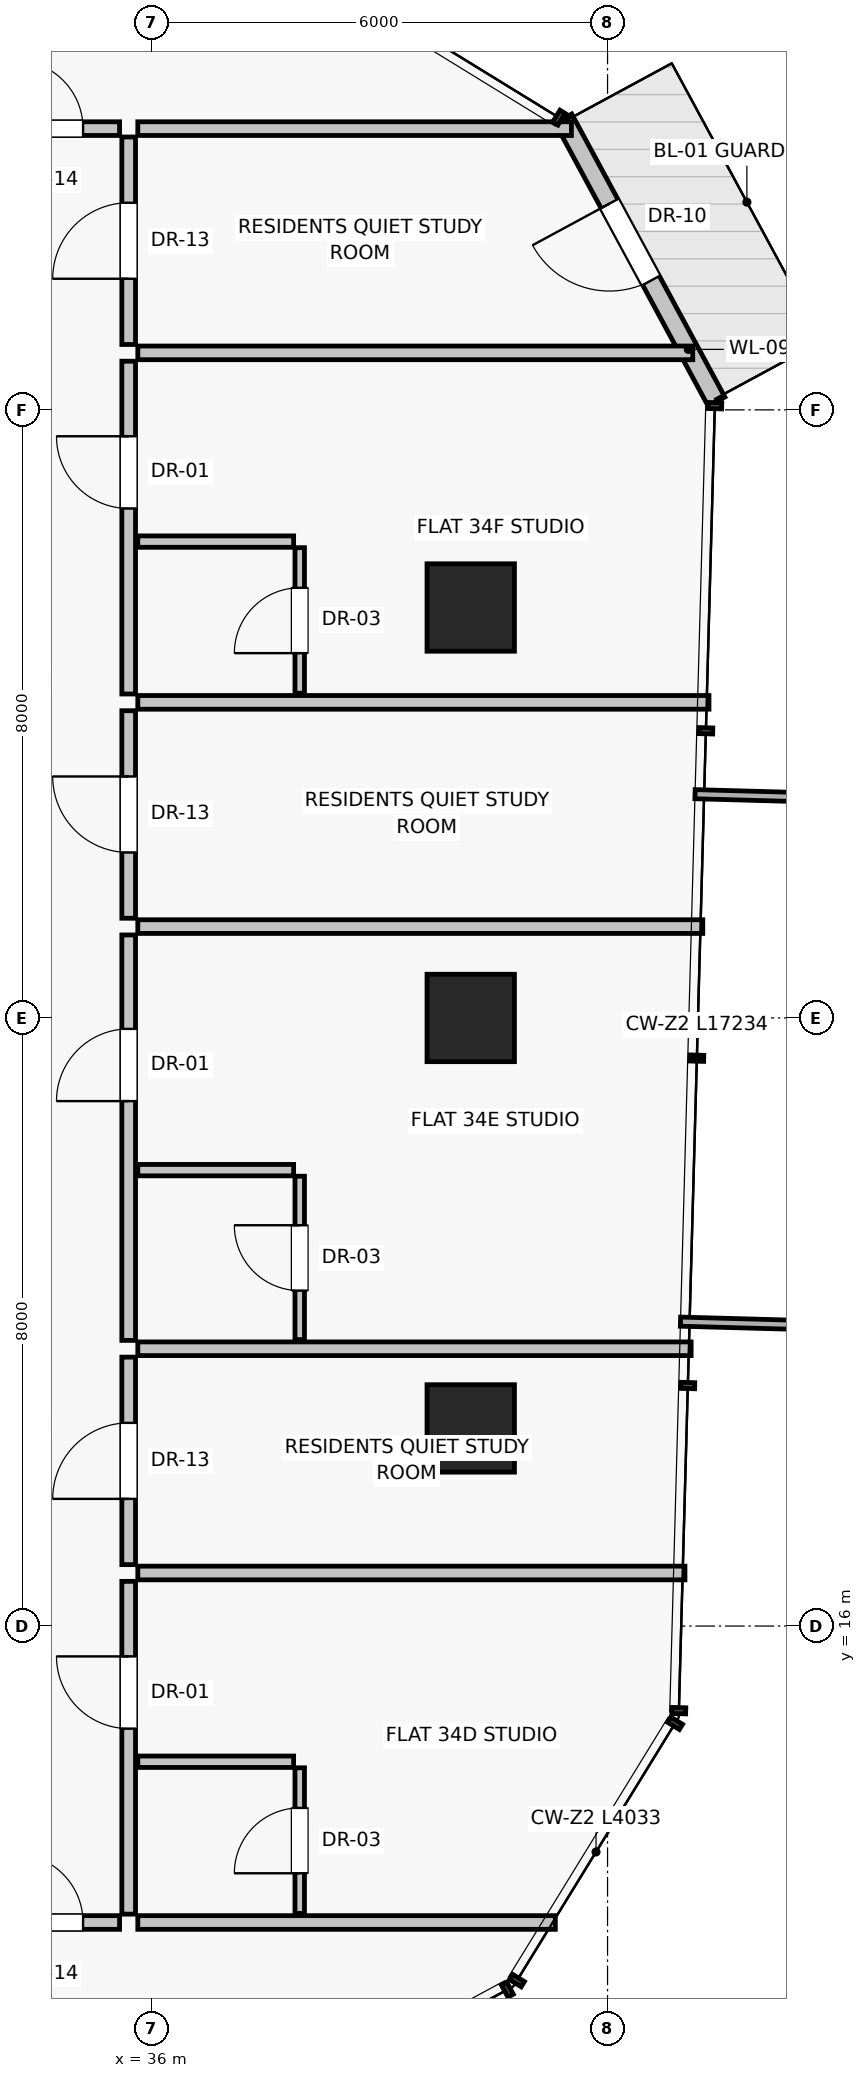
"""IFC4 building model, lengths in metres.
Left out: names, types, materials, properties, quantities, classifications, styles, units other than length and angle.
Written with IfcOpenShell. Run it as: python <this file> out.ifc"""

import sys

from ifc_helpers import new_model, si_unit, direction, frame, frame_2d, origin, origin_2d, place, context, subcontext, project, spatial, rectangle, extrude, source, transform, mapped, element, fill, save


model = new_model("IFC4")
c1 = context("Model", 3, precision=1e-05, world=origin(), true_north=direction((0.0, 1.0)))
c2 = subcontext(c1, "Body", "Model", "MODEL_VIEW")
j1 = project(units=[si_unit("LENGTHUNIT", "METRE"), si_unit("PLANEANGLEUNIT", "RADIAN")], contexts=[c1])
p1 = place(None, origin())
s1 = spatial("IfcSite", under=j1, at=p1, CompositionType="ELEMENT")
p2 = place(p1, origin())
s2 = spatial("IfcBuilding", under=s1, at=p2, CompositionType="ELEMENT")
p3 = place(p2, frame((0.0, 0.0, 123.0)))
s3 = spatial("IfcBuildingStorey", under=s2, at=p3, CompositionType="ELEMENT", Elevation=123.0)
for number, where, z_axis, x_axis in (
    (1, (40.2, 18.6, 0.0), (0.0, 0.0, 1.0), (1.0, 0.0, 0.0)),
    (2, (40.2, 24.0, 0.0), (0.0, 0.0, 1.0), (1.0, 0.0, 0.0)),
    (3, (40.2, 29.4, 0.0), (0.0, 0.0, 1.0), (1.0, 0.0, 0.0)),
):
    element("IfcColumn", number, at=place(p3, frame(where, z_axis=z_axis, x_axis=x_axis)), inside=s3, PredefinedType="COLUMN", context=c2, shape_type="SweptSolid", body=[
        extrude(rectangle(XDim=1.15, YDim=1.15, at=origin_2d()), origin(), (0.0, 0.0, 1.0), 3.25),
    ])
p4 = place(p3, frame((43.433, 32.11, 0.0), z_axis=(0.0, 0.0, 1.0), x_axis=(-0.47593195268, 0.879482106934, 0.0)))
e4 = element("IfcWall", 4, at=p4, inside=s3, PredefinedType="SOLIDWALL", context=c2, shape_type="SweptSolid", body=[
    extrude(rectangle(XDim=4.233, YDim=0.25, at=frame_2d((2.117, 0.0))), origin(), (0.0, 0.0, 1.0), 3.0),
])
p5 = place(p4, frame((1.81, 0.0, 0.0)))
e5 = element("IfcOpeningElement", 5, at=p5, cuts=e4, PredefinedType="OPENING", context=c2, shape_type="SweptSolid", body=[
    extrude(rectangle(XDim=1.15, YDim=2.25, at=frame_2d((0.575, 1.125))), frame((0.0, 0.135, 0.0), z_axis=(0.0, -1.0, 0.0), x_axis=(1.0, 0.0, 0.0)), (0.0, 0.0, 1.0), 0.27),
])
p6 = place(p3, frame((35.82, 12.1, 0.0), z_axis=(0.0, 0.0, 1.0), x_axis=(1.0, 0.0, 0.0)))
e6 = element("IfcWall", 6, at=p6, inside=s3, PredefinedType="PARTITIONING", context=c2, shape_type="SweptSolid", body=[
    extrude(rectangle(XDim=5.493, YDim=0.18, at=frame_2d((2.747, 0.0))), origin(), (0.0, 0.0, 1.0), 3.0),
])
p7 = place(p3, frame((35.82, 35.7, 0.0), z_axis=(0.0, 0.0, 1.0), x_axis=(1.0, 0.0, 0.0)))
e7 = element("IfcWall", 7, at=p7, inside=s3, PredefinedType="PARTITIONING", context=c2, shape_type="SweptSolid", body=[
    extrude(rectangle(XDim=5.705, YDim=0.18, at=frame_2d((2.852, 0.0))), origin(), (0.0, 0.0, 1.0), 3.0),
])
p8 = place(p3, frame((35.7, 16.808, 0.0), z_axis=(0.0, 0.0, 1.0), x_axis=(0.0, 1.0, 0.0)))
e8 = element("IfcWall", 8, at=p8, inside=s3, PredefinedType="PARTITIONING", context=c2, shape_type="SweptSolid", body=[
    extrude(rectangle(XDim=2.73, YDim=0.18, at=frame_2d((1.365, 0.0))), origin(), (0.0, 0.0, 1.0), 2.58),
])
p9 = place(p8, frame((0.865, 0.0, 0.0)))
e9 = element("IfcOpeningElement", 9, at=p9, cuts=e8, PredefinedType="OPENING", context=c2, shape_type="SweptSolid", body=[
    extrude(rectangle(XDim=1.0, YDim=2.01, at=frame_2d((0.5, 1.005))), frame((0.0, 0.1, 0.0), z_axis=(0.0, -1.0, 0.0), x_axis=(1.0, 0.0, 0.0)), (0.0, 0.0, 1.0), 0.2),
])
p10 = place(p3, frame((35.82, 16.698, 0.0), z_axis=(0.0, 0.0, 1.0), x_axis=(1.0, 0.0, 0.0)))
e10 = element("IfcWall", 10, at=p10, inside=s3, PredefinedType="PARTITIONING", context=c2, shape_type="SweptSolid", body=[
    extrude(rectangle(XDim=7.198, YDim=0.18, at=frame_2d((3.599, 0.0))), origin(), (0.0, 0.0, 1.0), 3.0),
])
p11 = place(p3, frame((35.7, 12.21, 0.0), z_axis=(0.0, 0.0, 1.0), x_axis=(0.0, 1.0, 0.0)))
e11 = element("IfcWall", 11, at=p11, inside=s3, PredefinedType="PARTITIONING", context=c2, shape_type="SweptSolid", body=[
    extrude(rectangle(XDim=4.378, YDim=0.18, at=frame_2d((2.189, 0.0))), origin(), (0.0, 0.0, 1.0), 3.0),
])
p12 = place(p11, frame((2.441, 0.0, 0.0)))
e12 = element("IfcOpeningElement", 12, at=p12, cuts=e11, PredefinedType="OPENING", context=c2, shape_type="SweptSolid", body=[
    extrude(rectangle(XDim=0.95, YDim=2.02, at=frame_2d((0.475, 1.01))), frame((0.0, 0.1, 0.0), z_axis=(0.0, -1.0, 0.0), x_axis=(1.0, 0.0, 0.0)), (0.0, 0.0, 1.0), 0.2),
])
p13 = place(p3, frame((35.82, 14.215, 0.0), z_axis=(0.0, 0.0, 1.0), x_axis=(1.0, 0.0, 0.0)))
e13 = element("IfcWall", 13, at=p13, inside=s3, PredefinedType="PARTITIONING", context=c2, shape_type="SweptSolid", body=[
    extrude(rectangle(XDim=2.05, YDim=0.15, at=frame_2d((1.025, 0.0))), origin(), (0.0, 0.0, 1.0), 3.0),
])
p14 = place(p3, frame((37.95, 12.22, 0.0), z_axis=(0.0, 0.0, 1.0), x_axis=(0.0, 1.0, 0.0)))
e14 = element("IfcWall", 14, at=p14, inside=s3, PredefinedType="PARTITIONING", context=c2, shape_type="SweptSolid", body=[
    extrude(rectangle(XDim=1.915, YDim=0.125, at=frame_2d((0.958, 0.0))), origin(), (0.0, 0.0, 1.0), 3.0),
])
p15 = place(p14, frame((0.528, 0.0, 0.0)))
e15 = element("IfcOpeningElement", 15, at=p15, cuts=e14, PredefinedType="OPENING", context=c2, shape_type="SweptSolid", body=[
    extrude(rectangle(XDim=0.86, YDim=2.01, at=frame_2d((0.43, 1.005))), frame((0.0, 0.073, 0.0), z_axis=(0.0, -1.0, 0.0), x_axis=(1.0, 0.0, 0.0)), (0.0, 0.0, 1.0), 0.145),
])
p16 = place(p3, frame((35.82, 19.648, 0.0), z_axis=(0.0, 0.0, 1.0), x_axis=(1.0, 0.0, 0.0)))
e16 = element("IfcWall", 16, at=p16, inside=s3, PredefinedType="PARTITIONING", context=c2, shape_type="SweptSolid", body=[
    extrude(rectangle(XDim=7.28, YDim=0.18, at=frame_2d((3.64, 0.0))), origin(), (0.0, 0.0, 1.0), 3.0),
])
p17 = place(p3, frame((35.7, 25.312, 0.0), z_axis=(0.0, 0.0, 1.0), x_axis=(0.0, 1.0, 0.0)))
e17 = element("IfcWall", 17, at=p17, inside=s3, PredefinedType="PARTITIONING", context=c2, shape_type="SweptSolid", body=[
    extrude(rectangle(XDim=2.73, YDim=0.18, at=frame_2d((1.365, 0.0))), origin(), (0.0, 0.0, 1.0), 2.58),
])
p18 = place(p17, frame((0.865, 0.0, 0.0)))
e18 = element("IfcOpeningElement", 18, at=p18, cuts=e17, PredefinedType="OPENING", context=c2, shape_type="SweptSolid", body=[
    extrude(rectangle(XDim=1.0, YDim=2.01, at=frame_2d((0.5, 1.005))), frame((0.0, 0.1, 0.0), z_axis=(0.0, -1.0, 0.0), x_axis=(1.0, 0.0, 0.0)), (0.0, 0.0, 1.0), 0.2),
])
p19 = place(p3, frame((35.82, 25.202, 0.0), z_axis=(0.0, 0.0, 1.0), x_axis=(1.0, 0.0, 0.0)))
e19 = element("IfcWall", 19, at=p19, inside=s3, PredefinedType="PARTITIONING", context=c2, shape_type="SweptSolid", body=[
    extrude(rectangle(XDim=7.433, YDim=0.18, at=frame_2d((3.716, 0.0))), origin(), (0.0, 0.0, 1.0), 3.0),
])
p20 = place(p3, frame((35.7, 19.758, 0.0), z_axis=(0.0, 0.0, 1.0), x_axis=(0.0, 1.0, 0.0)))
e20 = element("IfcWall", 20, at=p20, inside=s3, PredefinedType="PARTITIONING", context=c2, shape_type="SweptSolid", body=[
    extrude(rectangle(XDim=5.334, YDim=0.18, at=frame_2d((2.667, 0.0))), origin(), (0.0, 0.0, 1.0), 2.58),
])
p21 = place(p20, frame((3.148, 0.0, 0.0)))
e21 = element("IfcOpeningElement", 21, at=p21, cuts=e20, PredefinedType="OPENING", context=c2, shape_type="SweptSolid", body=[
    extrude(rectangle(XDim=0.95, YDim=2.02, at=frame_2d((0.475, 1.01))), frame((0.0, 0.1, 0.0), z_axis=(0.0, -1.0, 0.0), x_axis=(1.0, 0.0, 0.0)), (0.0, 0.0, 1.0), 0.2),
])
p22 = place(p3, frame((35.82, 21.998, 0.0), z_axis=(0.0, 0.0, 1.0), x_axis=(1.0, 0.0, 0.0)))
e22 = element("IfcWall", 22, at=p22, inside=s3, PredefinedType="PARTITIONING", context=c2, shape_type="SweptSolid", body=[
    extrude(rectangle(XDim=2.05, YDim=0.15, at=frame_2d((1.025, 0.0))), origin(), (0.0, 0.0, 1.0), 3.0),
])
p23 = place(p3, frame((37.95, 19.768, 0.0), z_axis=(0.0, 0.0, 1.0), x_axis=(0.0, 1.0, 0.0)))
e23 = element("IfcWall", 23, at=p23, inside=s3, PredefinedType="PARTITIONING", context=c2, shape_type="SweptSolid", body=[
    extrude(rectangle(XDim=2.15, YDim=0.125, at=frame_2d((1.075, 0.0))), origin(), (0.0, 0.0, 1.0), 3.0),
])
p24 = place(p23, frame((0.645, 0.0, 0.0)))
e24 = element("IfcOpeningElement", 24, at=p24, cuts=e23, PredefinedType="OPENING", context=c2, shape_type="SweptSolid", body=[
    extrude(rectangle(XDim=0.86, YDim=2.01, at=frame_2d((0.43, 1.005))), frame((0.0, 0.073, 0.0), z_axis=(0.0, -1.0, 0.0), x_axis=(1.0, 0.0, 0.0)), (0.0, 0.0, 1.0), 0.145),
])
p25 = place(p3, frame((35.82, 28.152, 0.0), z_axis=(0.0, 0.0, 1.0), x_axis=(1.0, 0.0, 0.0)))
e25 = element("IfcWall", 25, at=p25, inside=s3, PredefinedType="PARTITIONING", context=c2, shape_type="SweptSolid", body=[
    extrude(rectangle(XDim=7.514, YDim=0.18, at=frame_2d((3.757, 0.0))), origin(), (0.0, 0.0, 1.0), 3.0),
])
p26 = place(p3, frame((35.7, 32.86, 0.0), z_axis=(0.0, 0.0, 1.0), x_axis=(0.0, 1.0, 0.0)))
e26 = element("IfcWall", 26, at=p26, inside=s3, PredefinedType="PARTITIONING", context=c2, shape_type="SweptSolid", body=[
    extrude(rectangle(XDim=2.73, YDim=0.18, at=frame_2d((1.365, 0.0))), origin(), (0.0, 0.0, 1.0), 3.0),
])
p27 = place(p26, frame((0.865, 0.0, 0.0)))
e27 = element("IfcOpeningElement", 27, at=p27, cuts=e26, PredefinedType="OPENING", context=c2, shape_type="SweptSolid", body=[
    extrude(rectangle(XDim=1.0, YDim=2.01, at=frame_2d((0.5, 1.005))), frame((0.0, 0.1, 0.0), z_axis=(0.0, -1.0, 0.0), x_axis=(1.0, 0.0, 0.0)), (0.0, 0.0, 1.0), 0.2),
])
p28 = place(p3, frame((35.82, 32.75, 0.0), z_axis=(0.0, 0.0, 1.0), x_axis=(1.0, 0.0, 0.0)))
e28 = element("IfcWall", 28, at=p28, inside=s3, PredefinedType="PARTITIONING", context=c2, shape_type="SweptSolid", body=[
    extrude(rectangle(XDim=7.301, YDim=0.18, at=frame_2d((3.65, 0.0))), origin(), (0.0, 0.0, 1.0), 3.0),
])
p29 = place(p3, frame((35.7, 28.262, 0.0), z_axis=(0.0, 0.0, 1.0), x_axis=(0.0, 1.0, 0.0)))
e29 = element("IfcWall", 29, at=p29, inside=s3, PredefinedType="PARTITIONING", context=c2, shape_type="SweptSolid", body=[
    extrude(rectangle(XDim=4.378, YDim=0.18, at=frame_2d((2.189, 0.0))), origin(), (0.0, 0.0, 1.0), 2.58),
])
p30 = place(p29, frame((2.441, 0.0, 0.0)))
e30 = element("IfcOpeningElement", 30, at=p30, cuts=e29, PredefinedType="OPENING", context=c2, shape_type="SweptSolid", body=[
    extrude(rectangle(XDim=0.95, YDim=2.02, at=frame_2d((0.475, 1.01))), frame((0.0, 0.1, 0.0), z_axis=(0.0, -1.0, 0.0), x_axis=(1.0, 0.0, 0.0)), (0.0, 0.0, 1.0), 0.2),
])
p31 = place(p3, frame((35.82, 30.267, 0.0), z_axis=(0.0, 0.0, 1.0), x_axis=(1.0, 0.0, 0.0)))
e31 = element("IfcWall", 31, at=p31, inside=s3, PredefinedType="PARTITIONING", context=c2, shape_type="SweptSolid", body=[
    extrude(rectangle(XDim=2.05, YDim=0.15, at=frame_2d((1.025, 0.0))), origin(), (0.0, 0.0, 1.0), 2.378),
])
p32 = place(p3, frame((37.95, 28.272, 0.0), z_axis=(0.0, 0.0, 1.0), x_axis=(0.0, 1.0, 0.0)))
e32 = element("IfcWall", 32, at=p32, inside=s3, PredefinedType="PARTITIONING", context=c2, shape_type="SweptSolid", body=[
    extrude(rectangle(XDim=1.915, YDim=0.125, at=frame_2d((0.958, 0.0))), origin(), (0.0, 0.0, 1.0), 3.0),
])
p33 = place(p32, frame((0.528, 0.0, 0.0)))
e33 = element("IfcOpeningElement", 33, at=p33, cuts=e32, PredefinedType="OPENING", context=c2, shape_type="SweptSolid", body=[
    extrude(rectangle(XDim=0.86, YDim=2.01, at=frame_2d((0.43, 1.005))), frame((0.0, 0.073, 0.0), z_axis=(0.0, -1.0, 0.0), x_axis=(1.0, 0.0, 0.0)), (0.0, 0.0, 1.0), 0.145),
])
p34 = place(p3, frame((33.72, 12.1, 0.0), z_axis=(0.0, 0.0, 1.0), x_axis=(1.0, 0.0, 0.0)))
e34 = element("IfcWall", 34, at=p34, inside=s3, PredefinedType="PARTITIONING", context=c2, shape_type="SweptSolid", body=[
    extrude(rectangle(XDim=1.86, YDim=0.18, at=frame_2d((0.93, 0.0))), origin(), (0.0, 0.0, 1.0), 3.0),
])
p35 = place(p34, frame((0.48, 0.0, 0.0)))
e35 = element("IfcOpeningElement", 35, at=p35, cuts=e34, PredefinedType="OPENING", context=c2, shape_type="SweptSolid", body=[
    extrude(rectangle(XDim=0.9, YDim=2.01, at=frame_2d((0.45, 1.005))), frame((0.0, 0.1, 0.0), z_axis=(0.0, -1.0, 0.0), x_axis=(1.0, 0.0, 0.0)), (0.0, 0.0, 1.0), 0.2),
])
p36 = place(p3, frame((33.72, 35.7, 0.0), z_axis=(0.0, 0.0, 1.0), x_axis=(1.0, 0.0, 0.0)))
e36 = element("IfcWall", 36, at=p36, inside=s3, PredefinedType="PARTITIONING", context=c2, shape_type="SweptSolid", body=[
    extrude(rectangle(XDim=1.86, YDim=0.18, at=frame_2d((0.93, 0.0))), origin(), (0.0, 0.0, 1.0), 3.0),
])
p37 = place(p36, frame((0.48, 0.0, 0.0)))
e37 = element("IfcOpeningElement", 37, at=p37, cuts=e36, PredefinedType="OPENING", context=c2, shape_type="SweptSolid", body=[
    extrude(rectangle(XDim=0.9, YDim=2.01, at=frame_2d((0.45, 1.005))), frame((0.0, 0.1, 0.0), z_axis=(0.0, -1.0, 0.0), x_axis=(1.0, 0.0, 0.0)), (0.0, 0.0, 1.0), 0.2),
])
m1 = source(origin(), c2, "Body", "SweptSolid", [
    extrude(rectangle(XDim=1.15, YDim=2.25, at=frame_2d((0.575, 1.125))), frame((0.0, 0.025, 0.0), z_axis=(0.0, -1.0, 0.0), x_axis=(1.0, 0.0, 0.0)), (0.0, 0.0, 1.0), 0.05),
])
p38 = place(p5, frame((1.15, 0.0, 0.0), z_axis=(0.0, 0.0, 1.0), x_axis=(-1.0, 0.0, 0.0)))
e38 = element("IfcDoor", 38, at=p38, inside=s3, OperationType="SINGLE_SWING_RIGHT", PredefinedType="DOOR", context=c2, shape_type="MappedRepresentation", body=[
    mapped(m1, transform((0.0, 0.0, 0.0), scale=1.0)),
])
fill(e5, e38)
m2 = source(origin(), c2, "Body", "SweptSolid", [
    extrude(rectangle(XDim=1.0, YDim=2.01, at=frame_2d((0.5, 1.005))), frame((0.0, 0.025, 0.0), z_axis=(0.0, -1.0, 0.0), x_axis=(1.0, 0.0, 0.0)), (0.0, 0.0, 1.0), 0.05),
])
p39 = place(p9, origin())
e39 = element("IfcDoor", 39, at=p39, inside=s3, OperationType="SINGLE_SWING_LEFT", PredefinedType="DOOR", context=c2, shape_type="MappedRepresentation", body=[
    mapped(m2, transform((0.0, 0.0, 0.0), scale=1.0)),
])
fill(e9, e39)
m3 = source(origin(), c2, "Body", "SweptSolid", [
    extrude(rectangle(XDim=0.95, YDim=2.02, at=frame_2d((0.475, 1.01))), frame((0.0, 0.025, 0.0), z_axis=(0.0, -1.0, 0.0), x_axis=(1.0, 0.0, 0.0)), (0.0, 0.0, 1.0), 0.05),
])
p40 = place(p12, origin())
e40 = element("IfcDoor", 40, at=p40, inside=s3, OperationType="SINGLE_SWING_RIGHT", PredefinedType="DOOR", context=c2, shape_type="MappedRepresentation", body=[
    mapped(m3, transform((0.0, 0.0, 0.0), scale=1.0)),
])
fill(e12, e40)
m4 = source(origin(), c2, "Body", "SweptSolid", [
    extrude(rectangle(XDim=0.86, YDim=2.01, at=frame_2d((0.43, 1.005))), frame((0.0, 0.025, 0.0), z_axis=(0.0, -1.0, 0.0), x_axis=(1.0, 0.0, 0.0)), (0.0, 0.0, 1.0), 0.05),
])
p41 = place(p15, origin())
e41 = element("IfcDoor", 41, at=p41, inside=s3, OperationType="SINGLE_SWING_LEFT", PredefinedType="DOOR", context=c2, shape_type="MappedRepresentation", body=[
    mapped(m4, transform((0.0, 0.0, 0.0), scale=1.0)),
])
fill(e15, e41)
p42 = place(p18, origin())
e42 = element("IfcDoor", 42, at=p42, inside=s3, OperationType="SINGLE_SWING_RIGHT", PredefinedType="DOOR", context=c2, shape_type="MappedRepresentation", body=[
    mapped(m2, transform((0.0, 0.0, 0.0), scale=1.0)),
])
fill(e18, e42)
p43 = place(p21, origin())
e43 = element("IfcDoor", 43, at=p43, inside=s3, OperationType="SINGLE_SWING_LEFT", PredefinedType="DOOR", context=c2, shape_type="MappedRepresentation", body=[
    mapped(m3, transform((0.0, 0.0, 0.0), scale=1.0)),
])
fill(e21, e43)
p44 = place(p24, origin())
e44 = element("IfcDoor", 44, at=p44, inside=s3, OperationType="SINGLE_SWING_RIGHT", PredefinedType="DOOR", context=c2, shape_type="MappedRepresentation", body=[
    mapped(m4, transform((0.0, 0.0, 0.0), scale=1.0)),
])
fill(e24, e44)
p45 = place(p27, origin())
e45 = element("IfcDoor", 45, at=p45, inside=s3, OperationType="SINGLE_SWING_LEFT", PredefinedType="DOOR", context=c2, shape_type="MappedRepresentation", body=[
    mapped(m2, transform((0.0, 0.0, 0.0), scale=1.0)),
])
fill(e27, e45)
p46 = place(p30, origin())
e46 = element("IfcDoor", 46, at=p46, inside=s3, OperationType="SINGLE_SWING_RIGHT", PredefinedType="DOOR", context=c2, shape_type="MappedRepresentation", body=[
    mapped(m3, transform((0.0, 0.0, 0.0), scale=1.0)),
])
fill(e30, e46)
p47 = place(p33, origin())
e47 = element("IfcDoor", 47, at=p47, inside=s3, OperationType="SINGLE_SWING_LEFT", PredefinedType="DOOR", context=c2, shape_type="MappedRepresentation", body=[
    mapped(m4, transform((0.0, 0.0, 0.0), scale=1.0)),
])
fill(e33, e47)
m5 = source(origin(), c2, "Body", "SweptSolid", [
    extrude(rectangle(XDim=0.9, YDim=2.01, at=frame_2d((0.45, 1.005))), frame((0.0, 0.025, 0.0), z_axis=(0.0, -1.0, 0.0), x_axis=(1.0, 0.0, 0.0)), (0.0, 0.0, 1.0), 0.05),
])
p48 = place(p35, origin())
e48 = element("IfcDoor", 48, at=p48, inside=s3, OperationType="SINGLE_SWING_LEFT", PredefinedType="DOOR", context=c2, shape_type="MappedRepresentation", body=[
    mapped(m5, transform((0.0, 0.0, 0.0), scale=1.0)),
])
fill(e35, e48)
p49 = place(p37, origin())
e49 = element("IfcDoor", 49, at=p49, inside=s3, OperationType="SINGLE_SWING_LEFT", PredefinedType="DOOR", context=c2, shape_type="MappedRepresentation", body=[
    mapped(m5, transform((0.0, 0.0, 0.0), scale=1.0)),
])
fill(e37, e49)
save(model, sys.argv[1])
